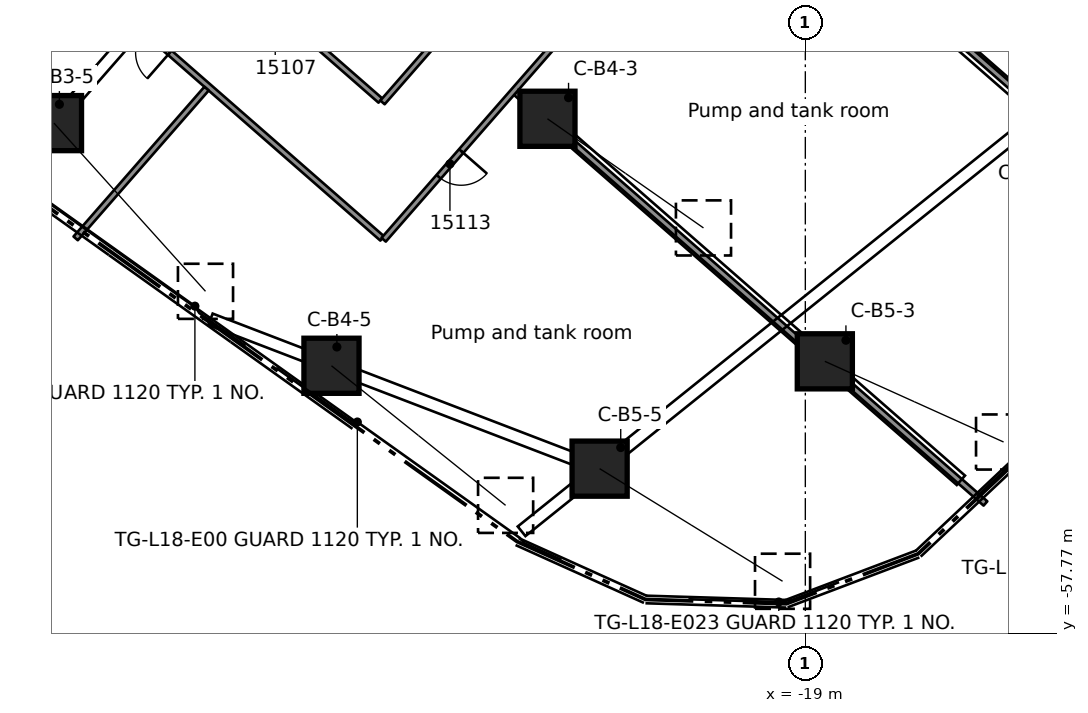
"""IFC4 building model, lengths in metres.
Left out: names, types, materials, properties, quantities, classifications, styles, units other than length and angle.
Written with IfcOpenShell. Run it as: python <this file> out.ifc"""

import sys

from ifc_helpers import new_model, si_unit, direction, frame, frame_2d, origin, origin_2d, place, context, subcontext, project, spatial, rectangle, extrude, element, fill, save


model = new_model("IFC4")
c1 = context("Model", 3, precision=1e-05, world=origin(), true_north=direction((0.0, 1.0)))
c2 = subcontext(c1, "Body", "Model", "MODEL_VIEW")
j1 = project(units=[si_unit("LENGTHUNIT", "METRE"), si_unit("PLANEANGLEUNIT", "RADIAN")], contexts=[c1])
p1 = place(None, origin())
s1 = spatial("IfcSite", under=j1, at=p1, CompositionType="ELEMENT")
p2 = place(p1, origin())
s2 = spatial("IfcBuilding", under=s1, at=p2, CompositionType="ELEMENT")
p3 = place(p2, frame((0.0, 0.0, 76.3)))
s3 = spatial("IfcBuildingStorey", under=s2, at=p3, CompositionType="ELEMENT", Elevation=76.3)
p4 = place(p3, frame((-38.771, -44.34, 0.642), z_axis=(0.593098292214, -0.65839684891, 0.463409112036), x_axis=(0.742990429267, 0.669302040949, 0.0)))
e1 = element("IfcColumn", 1, at=p4, inside=s3, PredefinedType="COLUMN", context=c2, shape_type="SweptSolid", body=[
    extrude(rectangle(XDim=1.45, YDim=1.45, at=origin_2d()), origin(), (0.0, 0.0, 1.0), 6.722),
])
p5 = place(p3, frame((-25.786, -44.226, 0.612), z_axis=(0.692169494024, -0.484123543715, 0.535281034563), x_axis=(0.573148371456, 0.819451611931, 0.0)))
e2 = element("IfcColumn", 2, at=p5, inside=s3, PredefinedType="COLUMN", context=c2, shape_type="SweptSolid", body=[
    extrude(rectangle(XDim=1.45, YDim=1.45, at=origin_2d()), origin(), (0.0, 0.0, 1.0), 5.932),
])
p6 = place(p3, frame((-31.469, -50.725, 0.64), z_axis=(0.689070625417, -0.552343269862, 0.469146656627), x_axis=(0.625445126174, 0.78026815528, 0.0)))
e3 = element("IfcColumn", 3, at=p6, inside=s3, PredefinedType="COLUMN", context=c2, shape_type="SweptSolid", body=[
    extrude(rectangle(XDim=1.45, YDim=1.45, at=origin_2d()), origin(), (0.0, 0.0, 1.0), 6.65),
])
p7 = place(p3, frame((-18.487, -50.608, 0.618), z_axis=(0.777095960952, -0.350717587525, 0.522607923086), x_axis=(0.411363636911, 0.911471315088, 0.0)))
e4 = element("IfcColumn", 4, at=p7, inside=s3, PredefinedType="COLUMN", context=c2, shape_type="SweptSolid", body=[
    extrude(rectangle(XDim=1.45, YDim=1.45, at=origin_2d()), origin(), (0.0, 0.0, 1.0), 6.053),
])
p8 = place(p3, frame((-24.413, -53.432, 0.634), z_axis=(0.744917193455, -0.458518104116, 0.484623073215), x_axis=(0.524186581487, 0.851603445148, 0.0)))
e5 = element("IfcColumn", 5, at=p8, inside=s3, PredefinedType="COLUMN", context=c2, shape_type="SweptSolid", body=[
    extrude(rectangle(XDim=1.45, YDim=1.45, at=origin_2d()), origin(), (0.0, 0.0, 1.0), 6.462),
])
p9 = place(p3, frame((-30.134, -47.375, 0.0), z_axis=(0.0, 0.0, 1.0), x_axis=(-0.752869704011, 0.658169589682, 0.0)))
e6 = element("IfcWall", 6, at=p9, inside=s3, PredefinedType="PARTITIONING", context=c2, shape_type="SweptSolid", body=[
    extrude(rectangle(XDim=9.65, YDim=0.15, at=frame_2d((4.825, 0.0))), origin(), (0.0, 0.0, 1.0), 3.98),
])
p10 = place(p9, frame((7.424, 0.0, 0.0)))
e7 = element("IfcOpeningElement", 7, at=p10, cuts=e6, PredefinedType="OPENING", context=c2, shape_type="SweptSolid", body=[
    extrude(rectangle(XDim=0.9, YDim=2.1, at=frame_2d((0.45, 1.05))), frame((0.0, 0.085, 0.0), z_axis=(0.0, -1.0, 0.0), x_axis=(1.0, 0.0, 0.0)), (0.0, 0.0, 1.0), 0.17),
])
p11 = place(p3, frame((-35.565, -39.04, 0.0), z_axis=(0.0, 0.0, 1.0), x_axis=(0.752862172491, -0.658178204768, 0.0)))
e8 = element("IfcWall", 8, at=p11, inside=s3, PredefinedType="PARTITIONING", context=c2, shape_type="SweptSolid", body=[
    extrude(rectangle(XDim=7.15, YDim=0.15, at=frame_2d((3.575, 0.0))), origin(), (0.0, 0.0, 1.0), 3.98),
])
p12 = place(p11, frame((3.025, 0.0, 0.0)))
e9 = element("IfcOpeningElement", 9, at=p12, cuts=e8, PredefinedType="OPENING", context=c2, shape_type="SweptSolid", body=[
    extrude(rectangle(XDim=0.9, YDim=2.1, at=frame_2d((0.45, 1.05))), frame((0.0, 0.085, 0.0), z_axis=(0.0, -1.0, 0.0), x_axis=(1.0, 0.0, 0.0)), (0.0, 0.0, 1.0), 0.17),
])
p13 = place(p3, frame((-26.617, -43.543, 0.0), z_axis=(0.0, 0.0, 1.0), x_axis=(0.752799620159, -0.658249748871, 0.0)))
e10 = element("IfcWall", 10, at=p13, inside=s3, PredefinedType="PARTITIONING", context=c2, shape_type="SweptSolid", body=[
    extrude(rectangle(XDim=16.415, YDim=0.15, at=frame_2d((8.207, 0.0))), origin(), (0.0, 0.0, 1.0), 3.98),
])
p14 = place(p3, frame((-20.89, -36.994, 0.0), z_axis=(0.0, 0.0, 1.0), x_axis=(0.752774169293, -0.658278854321, 0.0)))
e11 = element("IfcWall", 11, at=p14, inside=s3, PredefinedType="PARTITIONING", context=c2, shape_type="SweptSolid", body=[
    extrude(rectangle(XDim=15.851, YDim=0.15, at=frame_2d((7.925, 0.0))), origin(), (0.0, 0.0, 1.0), 3.98),
])
p15 = place(p3, frame((-17.402, -33.006, 0.0), z_axis=(0.0, 0.0, 1.0), x_axis=(0.752837171731, -0.658206800983, 0.0)))
e12 = element("IfcWall", 12, at=p15, inside=s3, PredefinedType="PARTITIONING", context=c2, shape_type="SweptSolid", body=[
    extrude(rectangle(XDim=15.325, YDim=0.15, at=frame_2d((7.663, 0.0))), origin(), (0.0, 0.0, 1.0), 3.98),
])
p16 = place(p3, frame((-13.766, -28.732, 0.0), z_axis=(0.0, 0.0, 1.0), x_axis=(-0.658218220516, -0.752827187461, 0.0)))
e13 = element("IfcWall", 13, at=p16, inside=s3, PredefinedType="PARTITIONING", context=c2, shape_type="SweptSolid", body=[
    extrude(rectangle(XDim=24.809, YDim=0.15, at=frame_2d((12.405, 0.0))), origin(), (0.0, 0.0, 1.0), 3.98),
])
p17 = place(p16, frame((1.103, 0.0, 0.0)))
e14 = element("IfcOpeningElement", 14, at=p17, cuts=e13, PredefinedType="OPENING", context=c2, shape_type="SweptSolid", body=[
    extrude(rectangle(XDim=0.9, YDim=2.1, at=frame_2d((0.45, 1.05))), frame((0.0, 0.085, 0.0), z_axis=(0.0, -1.0, 0.0), x_axis=(1.0, 0.0, 0.0)), (0.0, 0.0, 1.0), 0.17),
])
p18 = place(p16, frame((8.71, 0.0, 0.0)))
e15 = element("IfcOpeningElement", 15, at=p18, cuts=e13, PredefinedType="OPENING", context=c2, shape_type="SweptSolid", body=[
    extrude(rectangle(XDim=0.9, YDim=2.1, at=frame_2d((0.45, 1.05))), frame((0.0, 0.085, 0.0), z_axis=(0.0, -1.0, 0.0), x_axis=(1.0, 0.0, 0.0)), (0.0, 0.0, 1.0), 0.17),
])
p19 = place(p16, frame((14.759, 0.0, 0.0)))
e16 = element("IfcOpeningElement", 16, at=p19, cuts=e13, PredefinedType="OPENING", context=c2, shape_type="SweptSolid", body=[
    extrude(rectangle(XDim=0.9, YDim=2.1, at=frame_2d((0.45, 1.05))), frame((0.0, 0.085, 0.0), z_axis=(0.0, -1.0, 0.0), x_axis=(1.0, 0.0, 0.0)), (0.0, 0.0, 1.0), 0.17),
])
p20 = place(p16, frame((21.709, 0.0, 0.0)))
e17 = element("IfcOpeningElement", 17, at=p20, cuts=e13, PredefinedType="OPENING", context=c2, shape_type="SweptSolid", body=[
    extrude(rectangle(XDim=0.9, YDim=2.1, at=frame_2d((0.45, 1.05))), frame((0.0, 0.085, 0.0), z_axis=(0.0, -1.0, 0.0), x_axis=(1.0, 0.0, 0.0)), (0.0, 0.0, 1.0), 0.17),
])
p21 = place(p3, frame((-30.126, -43.795, 0.0), z_axis=(0.0, 0.0, 1.0), x_axis=(0.658319349285, 0.752738755716, 0.0)))
e18 = element("IfcWall", 18, at=p21, inside=s3, PredefinedType="PARTITIONING", context=c2, shape_type="SweptSolid", body=[
    extrude(rectangle(XDim=21.647, YDim=0.15, at=frame_2d((10.824, 0.0))), origin(), (0.0, 0.0, 1.0), 3.98),
])
p22 = place(p21, frame((13.3, 0.0, 0.0)))
e19 = element("IfcOpeningElement", 19, at=p22, cuts=e18, PredefinedType="OPENING", context=c2, shape_type="SweptSolid", body=[
    extrude(rectangle(XDim=0.9, YDim=2.1, at=frame_2d((0.45, 1.05))), frame((0.0, 0.085, 0.0), z_axis=(0.0, -1.0, 0.0), x_axis=(1.0, 0.0, 0.0)), (0.0, 0.0, 1.0), 0.17),
])
p23 = place(p21, frame((18.6, 0.0, 0.0)))
e20 = element("IfcOpeningElement", 20, at=p23, cuts=e18, PredefinedType="OPENING", context=c2, shape_type="SweptSolid", body=[
    extrude(rectangle(XDim=0.9, YDim=2.1, at=frame_2d((0.45, 1.05))), frame((0.0, 0.085, 0.0), z_axis=(0.0, -1.0, 0.0), x_axis=(1.0, 0.0, 0.0)), (0.0, 0.0, 1.0), 0.17),
])
p24 = place(p3, frame((-38.201, -47.373, 0.0), z_axis=(0.0, 0.0, 1.0), x_axis=(0.658220537384, 0.752825161751, 0.0)))
e21 = element("IfcWall", 21, at=p24, inside=s3, PredefinedType="PARTITIONING", context=c2, shape_type="SweptSolid", body=[
    extrude(rectangle(XDim=5.234, YDim=0.15, at=frame_2d((2.617, 0.0))), origin(), (0.0, 0.0, 1.0), 3.98),
])
p25 = place(p20, origin())
e22 = element("IfcDoor", 22, at=p25, inside=s3, OperationType="SINGLE_SWING_RIGHT", PredefinedType="DOOR", context=c2, shape_type="SweptSolid", body=[
    extrude(rectangle(XDim=0.9, YDim=2.1, at=frame_2d((0.45, 1.05))), frame((0.0, 0.025, 0.0), z_axis=(0.0, -1.0, 0.0), x_axis=(1.0, 0.0, 0.0)), (0.0, 0.0, 1.0), 0.05),
])
fill(e17, e22)
p26 = place(p10, origin())
e23 = element("IfcDoor", 23, at=p26, inside=s3, OperationType="SINGLE_SWING_RIGHT", PredefinedType="DOOR", context=c2, shape_type="SweptSolid", body=[
    extrude(rectangle(XDim=0.9, YDim=2.1, at=frame_2d((0.45, 1.05))), frame((0.0, 0.025, 0.0), z_axis=(0.0, -1.0, 0.0), x_axis=(1.0, 0.0, 0.0)), (0.0, 0.0, 1.0), 0.05),
])
fill(e7, e23)
save(model, sys.argv[1])
